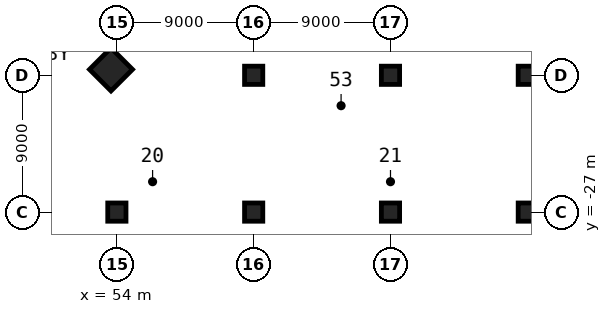
"""IFC4 building model, lengths in metres.
Left out: names, types, materials, properties, quantities, classifications, styles, units other than length and angle.
Written with IfcOpenShell. Run it as: python <this file> out.ifc"""

import sys

from ifc_helpers import new_model, si_unit, direction, frame, origin, origin_2d, place, context, subcontext, project, spatial, rectangle, extrude, element, save


model = new_model("IFC4")
c1 = context("Model", 3, precision=1e-05, world=origin(), true_north=direction((0.0, 1.0)))
c2 = subcontext(c1, "Body", "Model", "MODEL_VIEW")
j1 = project(units=[si_unit("LENGTHUNIT", "METRE"), si_unit("PLANEANGLEUNIT", "RADIAN")], contexts=[c1])
p1 = place(None, origin())
s1 = spatial("IfcSite", under=j1, at=p1, CompositionType="ELEMENT")
p2 = place(p1, origin())
s2 = spatial("IfcBuilding", under=s1, at=p2, CompositionType="ELEMENT")
p3 = place(p2, frame((0.0, 0.0, -9.0)))
s3 = spatial("IfcBuildingStorey", under=s2, at=p3, CompositionType="ELEMENT", Elevation=-9.0)
for number, where, z_axis, x_axis in (
    (1, (54.0, -27.0, 0.0), (0.0, 0.0, 1.0), (1.0, 0.0, 0.0)),
    (2, (63.0, -27.0, 0.0), (0.0, 0.0, 1.0), (1.0, 0.0, 0.0)),
    (3, (63.0, -18.0, 0.0), (0.0, 0.0, 1.0), (1.0, 0.0, 0.0)),
    (4, (72.0, -27.0, 0.0), (0.0, 0.0, 1.0), (1.0, 0.0, 0.0)),
    (5, (72.0, -18.0, 0.0), (0.0, 0.0, 1.0), (1.0, 0.0, 0.0)),
    (6, (81.0, -27.0, 0.0), (0.0, 0.0, 1.0), (1.0, 0.0, 0.0)),
    (7, (81.0, -18.0, 0.0), (0.0, 0.0, 1.0), (1.0, 0.0, 0.0)),
):
    element("IfcColumn", number, at=place(p3, frame(where, z_axis=z_axis, x_axis=x_axis)), inside=s3, PredefinedType="COLUMN", context=c2, shape_type="SweptSolid", body=[
        extrude(rectangle(XDim=1.2, YDim=1.2, at=origin_2d()), origin(), (0.0, 0.0, 1.0), 4.5),
    ])
p4 = place(p3, frame((53.614, -17.614, 0.0), z_axis=(0.0, 0.0, 1.0), x_axis=(0.707106781187, -0.707106781187, 0.0)))
e8 = element("IfcColumn", 8, at=p4, inside=s3, PredefinedType="COLUMN", context=c2, shape_type="SweptSolid", body=[
    extrude(rectangle(XDim=2.0, YDim=2.0, at=origin_2d()), origin(), (0.0, 0.0, 1.0), 4.5),
])
save(model, sys.argv[1])
